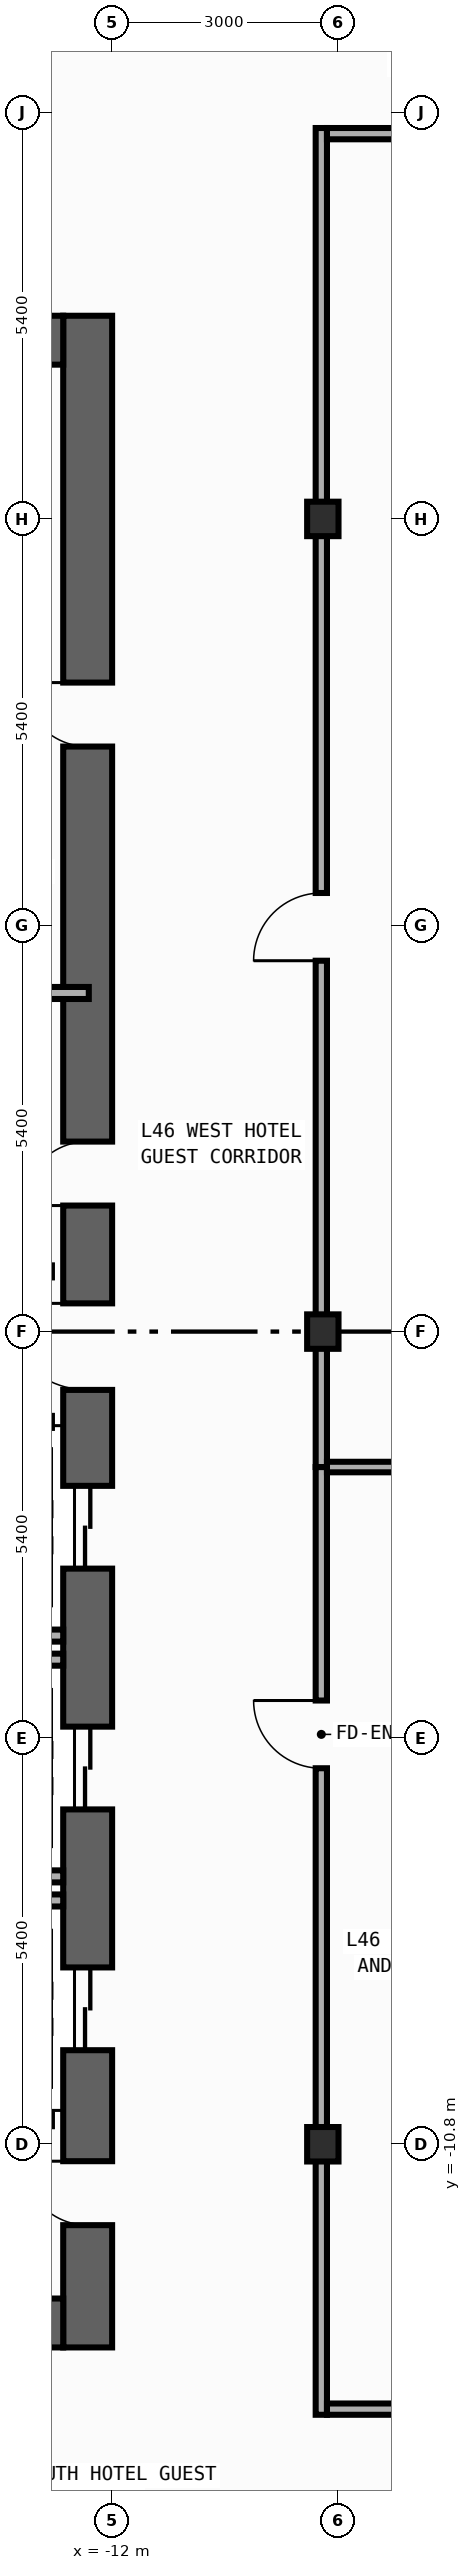
"""IFC4 building model, lengths in metres.
Left out: names, types, materials, properties, quantities, classifications, styles, units other than length and angle.
Written with IfcOpenShell. Run it as: python <this file> out.ifc"""

import sys

from ifc_helpers import new_model, si_unit, direction, frame, frame_2d, origin, origin_2d, place, context, subcontext, project, spatial, rectangle, i_section, extrude, element, fill, save


model = new_model("IFC4")
c1 = context("Model", 3, precision=1e-05, world=origin(), true_north=direction((0.0, 1.0)))
c2 = subcontext(c1, "Body", "Model", "MODEL_VIEW")
j1 = project(units=[si_unit("LENGTHUNIT", "METRE"), si_unit("PLANEANGLEUNIT", "RADIAN")], contexts=[c1])
p1 = place(None, origin())
s1 = spatial("IfcSite", under=j1, at=p1, CompositionType="ELEMENT")
p2 = place(p1, origin())
s2 = spatial("IfcBuilding", under=s1, at=p2, CompositionType="ELEMENT")
p3 = place(p2, frame((0.0, 0.0, 199.2)))
s3 = spatial("IfcBuildingStorey", under=s2, at=p3, CompositionType="ELEMENT", Elevation=199.2)
p4 = place(p3, frame((-12.325, -13.5, 0.0), z_axis=(0.0, 0.0, 1.0), x_axis=(0.0, 1.0, 0.0)))
e1 = element("IfcWall", 1, at=p4, inside=s3, PredefinedType="SHEAR", context=c2, shape_type="SweptSolid", body=[
    extrude(rectangle(XDim=27.0, YDim=0.65, at=frame_2d((13.5, 0.0))), origin(), (0.0, 0.0, 1.0), 3.54),
])
p5 = place(p4, frame((10.35, 0.0, 0.0)))
e2 = element("IfcOpeningElement", 2, at=p5, cuts=e1, PredefinedType="OPENING", context=c2, shape_type="SweptSolid", body=[
    extrude(rectangle(XDim=1.1, YDim=2.2, at=frame_2d((0.55, 1.1))), frame((0.0, 0.335, 0.0), z_axis=(0.0, -1.0, 0.0), x_axis=(1.0, 0.0, 0.0)), (0.0, 0.0, 1.0), 0.67),
])
p6 = place(p4, frame((7.15, 0.0, 0.0)))
e3 = element("IfcOpeningElement", 3, at=p6, cuts=e1, PredefinedType="OPENING", context=c2, shape_type="SweptSolid", body=[
    extrude(rectangle(XDim=1.1, YDim=2.2, at=frame_2d((0.55, 1.1))), frame((0.0, 0.335, 0.0), z_axis=(0.0, -1.0, 0.0), x_axis=(1.0, 0.0, 0.0)), (0.0, 0.0, 1.0), 0.67),
])
p7 = place(p4, frame((3.95, 0.0, 0.0)))
e4 = element("IfcOpeningElement", 4, at=p7, cuts=e1, PredefinedType="OPENING", context=c2, shape_type="SweptSolid", body=[
    extrude(rectangle(XDim=1.1, YDim=2.2, at=frame_2d((0.55, 1.1))), frame((0.0, 0.335, 0.0), z_axis=(0.0, -1.0, 0.0), x_axis=(1.0, 0.0, 0.0)), (0.0, 0.0, 1.0), 0.67),
])
p8 = place(p4, frame((15.175, 0.0, 0.0)))
e5 = element("IfcOpeningElement", 5, at=p8, cuts=e1, PredefinedType="OPENING", context=c2, shape_type="SweptSolid", body=[
    extrude(rectangle(XDim=0.85, YDim=2.1, at=frame_2d((0.425, 1.05))), frame((0.0, 0.335, 0.0), z_axis=(0.0, -1.0, 0.0), x_axis=(1.0, 0.0, 0.0)), (0.0, 0.0, 1.0), 0.67),
])
p9 = place(p4, frame((21.275, 0.0, 0.0)))
e6 = element("IfcOpeningElement", 6, at=p9, cuts=e1, PredefinedType="OPENING", context=c2, shape_type="SweptSolid", body=[
    extrude(rectangle(XDim=0.85, YDim=2.1, at=frame_2d((0.425, 1.05))), frame((0.0, 0.335, 0.0), z_axis=(0.0, -1.0, 0.0), x_axis=(1.0, 0.0, 0.0)), (0.0, 0.0, 1.0), 0.67),
])
p10 = place(p4, frame((12.725, 0.0, 0.0)))
e7 = element("IfcOpeningElement", 7, at=p10, cuts=e1, PredefinedType="OPENING", context=c2, shape_type="SweptSolid", body=[
    extrude(rectangle(XDim=1.15, YDim=2.2, at=frame_2d((0.575, 1.1))), frame((0.0, 0.335, 0.0), z_axis=(0.0, -1.0, 0.0), x_axis=(1.0, 0.0, 0.0)), (0.0, 0.0, 1.0), 0.67),
])
p11 = place(p4, frame((1.625, 0.0, 0.0)))
e8 = element("IfcOpeningElement", 8, at=p11, cuts=e1, PredefinedType="OPENING", context=c2, shape_type="SweptSolid", body=[
    extrude(rectangle(XDim=0.85, YDim=2.1, at=frame_2d((0.425, 1.05))), frame((0.0, 0.335, 0.0), z_axis=(0.0, -1.0, 0.0), x_axis=(1.0, 0.0, 0.0)), (0.0, 0.0, 1.0), 0.67),
])
for number, where, z_axis, x_axis in (
    (9, (-19.75, -13.175, 0.0), (0.0, 0.0, 1.0), (1.0, 0.0, 0.0)),
    (10, (-19.75, 13.175, 0.0), (0.0, 0.0, 1.0), (1.0, 0.0, 0.0)),
):
    element("IfcWall", number, at=place(p3, frame(where, z_axis=z_axis, x_axis=x_axis)), inside=s3, PredefinedType="SHEAR", context=c2, shape_type="SweptSolid", body=[
        extrude(rectangle(XDim=7.1, YDim=0.65, at=frame_2d((3.55, 0.0))), origin(), (0.0, 0.0, 1.0), 3.54),
    ])
for number, where, z_axis, x_axis in (
    (11, (-9.2, -10.8, 0.0), (0.0, 0.0, 1.0), (1.0, 0.0, 0.0)),
    (12, (-9.2, 0.0, 0.0), (0.0, 0.0, 1.0), (1.0, 0.0, 0.0)),
    (13, (-9.2, 10.8, 0.0), (0.0, 0.0, 1.0), (1.0, 0.0, 0.0)),
):
    element("IfcColumn", number, at=place(p3, frame(where, z_axis=z_axis, x_axis=x_axis)), inside=s3, PredefinedType="COLUMN", context=c2, shape_type="SweptSolid", body=[
        extrude(i_section(OverallWidth=0.417, OverallDepth=0.458, WebThickness=0.03, FlangeThickness=0.05, FilletRadius=0.022, at=origin_2d()), origin(), (0.0, 0.0, 1.0), 3.8),
    ])
for number, where, z_axis, x_axis in (
    (14, (-14.99, -4.04, 0.0), (0.0, 0.0, 1.0), (1.0, 0.0, 0.0)),
    (15, (-14.99, -7.24, 0.0), (0.0, 0.0, 1.0), (1.0, 0.0, 0.0)),
    (16, (-14.99, -4.36, 0.0), (0.0, 0.0, 1.0), (1.0, 0.0, 0.0)),
    (17, (-14.99, -7.56, 0.0), (0.0, 0.0, 1.0), (1.0, 0.0, 0.0)),
):
    element("IfcWall", number, at=place(p3, frame(where, z_axis=z_axis, x_axis=x_axis)), inside=s3, PredefinedType="STANDARD", context=c2, shape_type="SweptSolid", body=[
        extrude(rectangle(XDim=2.34, YDim=0.16, at=frame_2d((1.17, 0.0))), origin(), (0.0, 0.0, 1.0), 3.54),
    ])
p12 = place(p3, frame((-15.375, 4.5, 0.0), z_axis=(0.0, 0.0, 1.0), x_axis=(1.0, 0.0, 0.0)))
e18 = element("IfcWall", 18, at=p12, inside=s3, PredefinedType="PARTITIONING", context=c2, shape_type="SweptSolid", body=[
    extrude(rectangle(XDim=3.065, YDim=0.16, at=frame_2d((1.532, 0.0))), origin(), (0.0, 0.0, 1.0), 3.54),
])
p13 = place(p3, frame((-9.22, -14.395, 0.0), z_axis=(0.0, 0.0, 1.0), x_axis=(0.0, 1.0, 0.0)))
e19 = element("IfcWall", 19, at=p13, inside=s3, PredefinedType="PARTITIONING", context=c2, shape_type="SweptSolid", body=[
    extrude(rectangle(XDim=12.595, YDim=0.15, at=frame_2d((6.297, 0.0))), origin(), (0.0, 0.0, 1.0), 2.952),
])
p14 = place(p13, frame((8.592, 0.0, 0.0)))
e20 = element("IfcOpeningElement", 20, at=p14, cuts=e19, PredefinedType="OPENING", context=c2, shape_type="SweptSolid", body=[
    extrude(rectangle(XDim=0.9, YDim=2.15, at=frame_2d((0.45, 1.075))), frame((0.0, 0.085, 0.0), z_axis=(0.0, -1.0, 0.0), x_axis=(1.0, 0.0, 0.0)), (0.0, 0.0, 1.0), 0.17),
])
p15 = place(p3, frame((-9.22, -1.8, 0.0), z_axis=(0.0, 0.0, 1.0), x_axis=(0.0, 1.0, 0.0)))
e21 = element("IfcWall", 21, at=p15, inside=s3, PredefinedType="PARTITIONING", context=c2, shape_type="SweptSolid", body=[
    extrude(rectangle(XDim=17.795, YDim=0.15, at=frame_2d((8.897, 0.0))), origin(), (0.0, 0.0, 1.0), 2.952),
])
p16 = place(p15, frame((6.729, 0.0, 0.0)))
e22 = element("IfcOpeningElement", 22, at=p16, cuts=e21, PredefinedType="OPENING", context=c2, shape_type="SweptSolid", body=[
    extrude(rectangle(XDim=0.9, YDim=2.15, at=frame_2d((0.45, 1.075))), frame((0.0, 0.085, 0.0), z_axis=(0.0, -1.0, 0.0), x_axis=(1.0, 0.0, 0.0)), (0.0, 0.0, 1.0), 0.17),
])
p17 = place(p3, frame((-9.145, 15.92, 0.0), z_axis=(0.0, 0.0, 1.0), x_axis=(1.0, 0.0, 0.0)))
e23 = element("IfcWall", 23, at=p17, inside=s3, PredefinedType="PARTITIONING", context=c2, shape_type="SweptSolid", body=[
    extrude(rectangle(XDim=18.29, YDim=0.15, at=frame_2d((9.145, 0.0))), origin(), (0.0, 0.0, 1.0), 3.54),
])
p18 = place(p17, frame((15.725, 0.0, 0.0)))
e24 = element("IfcOpeningElement", 24, at=p18, cuts=e23, PredefinedType="OPENING", context=c2, shape_type="SweptSolid", body=[
    extrude(rectangle(XDim=0.9, YDim=2.15, at=frame_2d((0.45, 1.075))), frame((0.0, 0.085, 0.0), z_axis=(0.0, -1.0, 0.0), x_axis=(1.0, 0.0, 0.0)), (0.0, 0.0, 1.0), 0.17),
])
p19 = place(p3, frame((-9.145, -14.32, 0.0), z_axis=(0.0, 0.0, 1.0), x_axis=(1.0, 0.0, 0.0)))
e25 = element("IfcWall", 25, at=p19, inside=s3, PredefinedType="PARTITIONING", context=c2, shape_type="SweptSolid", body=[
    extrude(rectangle(XDim=3.025, YDim=0.15, at=frame_2d((1.512, 0.0))), origin(), (0.0, 0.0, 1.0), 3.54),
])
p20 = place(p19, frame((1.665, 0.0, 0.0)))
e26 = element("IfcOpeningElement", 26, at=p20, cuts=e25, PredefinedType="OPENING", context=c2, shape_type="SweptSolid", body=[
    extrude(rectangle(XDim=0.9, YDim=2.15, at=frame_2d((0.45, 1.075))), frame((0.0, 0.085, 0.0), z_axis=(0.0, -1.0, 0.0), x_axis=(1.0, 0.0, 0.0)), (0.0, 0.0, 1.0), 0.17),
])
p21 = place(p3, frame((-9.145, -1.8, 0.0), z_axis=(0.0, 0.0, 1.0), x_axis=(1.0, 0.0, 0.0)))
e27 = element("IfcWall", 27, at=p21, inside=s3, PredefinedType="PARTITIONING", context=c2, shape_type="SweptSolid", body=[
    extrude(rectangle(XDim=3.025, YDim=0.14, at=frame_2d((1.512, 0.0))), origin(), (0.0, 0.0, 1.0), 3.54),
])
p22 = place(p5, origin())
e28 = element("IfcDoor", 28, at=p22, inside=s3, OperationType="DOUBLE_DOOR_SLIDING", PredefinedType="DOOR", context=c2, shape_type="SweptSolid", body=[
    extrude(rectangle(XDim=1.1, YDim=2.2, at=frame_2d((0.55, 1.1))), frame((0.0, 0.025, 0.0), z_axis=(0.0, -1.0, 0.0), x_axis=(1.0, 0.0, 0.0)), (0.0, 0.0, 1.0), 0.05),
])
fill(e2, e28)
p23 = place(p6, origin())
e29 = element("IfcDoor", 29, at=p23, inside=s3, OperationType="DOUBLE_DOOR_SLIDING", PredefinedType="DOOR", context=c2, shape_type="SweptSolid", body=[
    extrude(rectangle(XDim=1.1, YDim=2.2, at=frame_2d((0.55, 1.1))), frame((0.0, 0.025, 0.0), z_axis=(0.0, -1.0, 0.0), x_axis=(1.0, 0.0, 0.0)), (0.0, 0.0, 1.0), 0.05),
])
fill(e3, e29)
p24 = place(p7, origin())
e30 = element("IfcDoor", 30, at=p24, inside=s3, OperationType="DOUBLE_DOOR_SLIDING", PredefinedType="DOOR", context=c2, shape_type="SweptSolid", body=[
    extrude(rectangle(XDim=1.1, YDim=2.2, at=frame_2d((0.55, 1.1))), frame((0.0, 0.025, 0.0), z_axis=(0.0, -1.0, 0.0), x_axis=(1.0, 0.0, 0.0)), (0.0, 0.0, 1.0), 0.05),
])
fill(e4, e30)
p25 = place(p8, origin())
e31 = element("IfcDoor", 31, at=p25, inside=s3, OperationType="SINGLE_SWING_LEFT", PredefinedType="DOOR", context=c2, shape_type="SweptSolid", body=[
    extrude(rectangle(XDim=0.85, YDim=2.1, at=frame_2d((0.425, 1.05))), frame((0.0, 0.025, 0.0), z_axis=(0.0, -1.0, 0.0), x_axis=(1.0, 0.0, 0.0)), (0.0, 0.0, 1.0), 0.05),
])
fill(e5, e31)
p26 = place(p9, origin())
e32 = element("IfcDoor", 32, at=p26, inside=s3, OperationType="SINGLE_SWING_RIGHT", PredefinedType="DOOR", context=c2, shape_type="SweptSolid", body=[
    extrude(rectangle(XDim=0.85, YDim=2.1, at=frame_2d((0.425, 1.05))), frame((0.0, 0.025, 0.0), z_axis=(0.0, -1.0, 0.0), x_axis=(1.0, 0.0, 0.0)), (0.0, 0.0, 1.0), 0.05),
])
fill(e6, e32)
p27 = place(p10, origin())
e33 = element("IfcDoor", 33, at=p27, inside=s3, OperationType="SINGLE_SWING_RIGHT", PredefinedType="DOOR", context=c2, shape_type="SweptSolid", body=[
    extrude(rectangle(XDim=1.15, YDim=2.2, at=frame_2d((0.575, 1.1))), frame((0.0, 0.025, 0.0), z_axis=(0.0, -1.0, 0.0), x_axis=(1.0, 0.0, 0.0)), (0.0, 0.0, 1.0), 0.05),
])
fill(e7, e33)
p28 = place(p11, origin())
e34 = element("IfcDoor", 34, at=p28, inside=s3, OperationType="SINGLE_SWING_RIGHT", PredefinedType="DOOR", context=c2, shape_type="SweptSolid", body=[
    extrude(rectangle(XDim=0.85, YDim=2.1, at=frame_2d((0.425, 1.05))), frame((0.0, 0.025, 0.0), z_axis=(0.0, -1.0, 0.0), x_axis=(1.0, 0.0, 0.0)), (0.0, 0.0, 1.0), 0.05),
])
fill(e8, e34)
p29 = place(p14, origin())
e35 = element("IfcDoor", 35, at=p29, inside=s3, OperationType="SINGLE_SWING_RIGHT", PredefinedType="DOOR", context=c2, shape_type="SweptSolid", body=[
    extrude(rectangle(XDim=0.9, YDim=2.15, at=frame_2d((0.45, 1.075))), frame((0.0, 0.025, 0.0), z_axis=(0.0, -1.0, 0.0), x_axis=(1.0, 0.0, 0.0)), (0.0, 0.0, 1.0), 0.05),
])
fill(e20, e35)
p30 = place(p16, origin())
e36 = element("IfcDoor", 36, at=p30, inside=s3, OperationType="SINGLE_SWING_LEFT", PredefinedType="DOOR", context=c2, shape_type="SweptSolid", body=[
    extrude(rectangle(XDim=0.9, YDim=2.15, at=frame_2d((0.45, 1.075))), frame((0.0, 0.025, 0.0), z_axis=(0.0, -1.0, 0.0), x_axis=(1.0, 0.0, 0.0)), (0.0, 0.0, 1.0), 0.05),
])
fill(e22, e36)
save(model, sys.argv[1])
